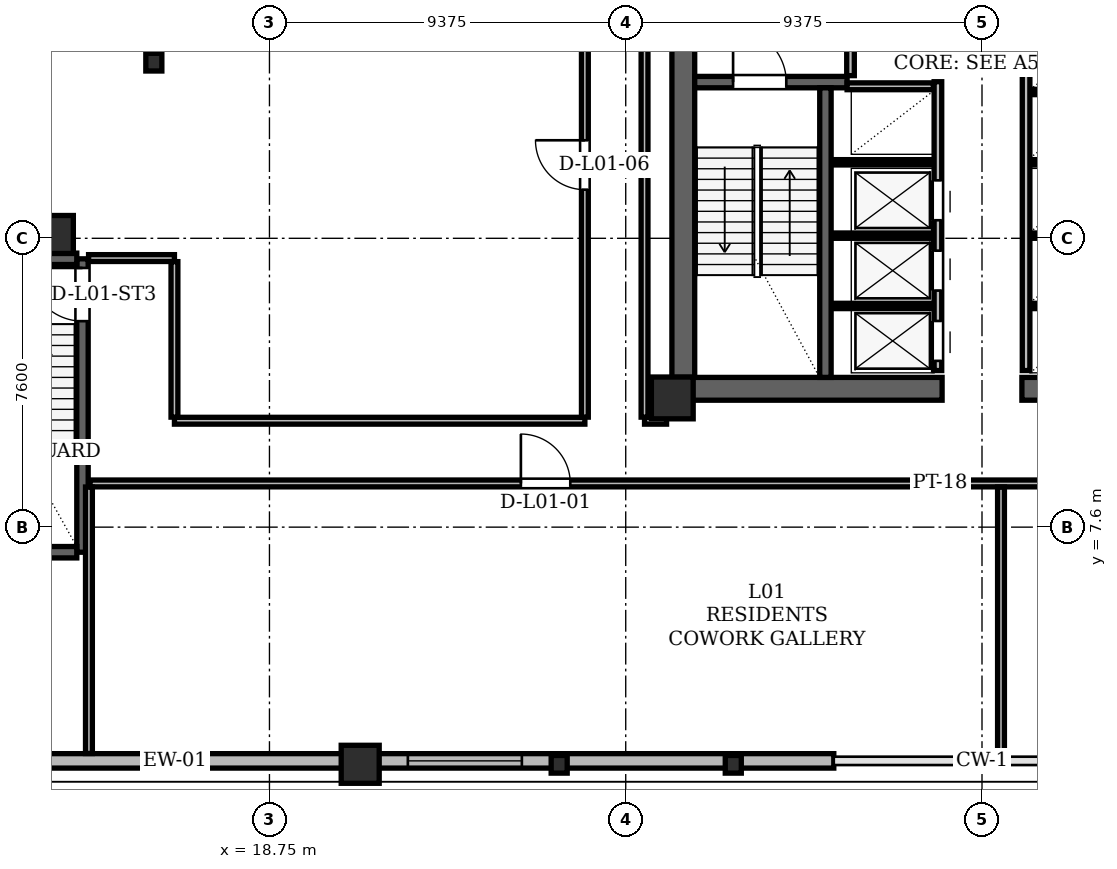
"""IFC4 building model, lengths in metres.
Left out: names, types, materials, properties, quantities, classifications, styles, units other than length and angle.
Written with IfcOpenShell. Run it as: python <this file> out.ifc"""

import sys

from ifc_helpers import new_model, si_unit, direction, frame, frame_2d, origin, origin_2d, place, context, subcontext, project, spatial, rectangle, hollow_rectangle, i_section, extrude, element, fill, save


model = new_model("IFC4")
c1 = context("Model", 3, precision=1e-05, world=origin(), true_north=direction((0.0, 1.0)))
c2 = subcontext(c1, "Body", "Model", "MODEL_VIEW")
j1 = project(units=[si_unit("LENGTHUNIT", "METRE"), si_unit("PLANEANGLEUNIT", "RADIAN")], contexts=[c1])
p1 = place(None, origin())
s1 = spatial("IfcSite", under=j1, at=p1, CompositionType="ELEMENT")
p2 = place(p1, origin())
s2 = spatial("IfcBuilding", under=s1, at=p2, CompositionType="ELEMENT")
p3 = place(p2, frame((0.0, 0.0, 5.4)))
s3 = spatial("IfcBuildingStorey", under=s2, at=p3, CompositionType="ELEMENT", Elevation=5.4)
p4 = place(p3, frame((29.35, 11.0, 0.0), z_axis=(0.0, 0.0, 1.0), x_axis=(1.0, 0.0, 0.0)))
e1 = element("IfcColumn", 1, at=p4, inside=s3, PredefinedType="COLUMN", context=c2, shape_type="SweptSolid", body=[
    extrude(hollow_rectangle(XDim=1.1, YDim=1.1, WallThickness=0.09, at=origin_2d()), origin(), (0.0, 0.0, 1.0), 4.5),
])
for number, where, z_axis, x_axis in (
    (2, (13.09, 15.3, 0.005), (0.0, 0.0, 1.0), (1.0, 0.0, 0.0)),
    (3, (21.138, 1.36, 0.005), (0.0, 0.0, 1.0), (1.0, 0.0, 0.0)),
):
    element("IfcColumn", number, at=place(p3, frame(where, z_axis=z_axis, x_axis=x_axis)), inside=s3, PredefinedType="COLUMN", context=c2, shape_type="SweptSolid", body=[
        extrude(hollow_rectangle(XDim=1.0, YDim=1.0, WallThickness=0.085, at=origin_2d()), origin(), (0.0, 0.0, 1.0), 4.491),
    ])
for number, where, z_axis, x_axis in (
    (4, (26.374, 1.36, 0.005), (0.0, 0.0, 1.0), (1.0, 0.0, 0.0)),
    (5, (30.955, 1.36, 0.005), (0.0, 0.0, 1.0), (1.0, 0.0, 0.0)),
    (6, (15.708, 19.834, 0.005), (0.0, 0.0, 1.0), (1.0, 0.0, 0.0)),
):
    element("IfcColumn", number, at=place(p3, frame(where, z_axis=z_axis, x_axis=x_axis)), inside=s3, PredefinedType="COLUMN", context=c2, shape_type="SweptSolid", body=[
        extrude(i_section(OverallWidth=0.422, OverallDepth=0.465, WebThickness=0.045, FlangeThickness=0.072, at=origin_2d()), origin(), (0.0, 0.0, 1.0), 4.491),
    ])
p5 = place(p3, frame((29.64, 11.0, 0.0), z_axis=(0.0, 0.0, 1.0), x_axis=(0.0, 1.0, 0.0)))
e7 = element("IfcWall", 7, at=p5, inside=s3, PredefinedType="SHEAR", context=c2, shape_type="SweptSolid", body=[
    extrude(rectangle(XDim=13.3, YDim=0.6, at=frame_2d((6.65, 0.0))), origin(), (0.0, 0.0, 1.0), 4.22),
])
for number, where, z_axis, x_axis in (
    (8, (29.35, 11.24, 0.0), (0.0, 0.0, 1.0), (1.0, 0.0, 0.0)),
    (9, (38.55, 11.24, 0.0), (0.0, 0.0, 1.0), (1.0, 0.0, 0.0)),
):
    element("IfcWall", number, at=place(p3, frame(where, z_axis=z_axis, x_axis=x_axis)), inside=s3, PredefinedType="SHEAR", context=c2, shape_type="SweptSolid", body=[
        extrude(rectangle(XDim=7.1, YDim=0.6, at=frame_2d((3.55, 0.0))), origin(), (0.0, 0.0, 1.0), 4.22),
    ])
p6 = place(p3, frame((29.94, 19.31, 0.0), z_axis=(0.0, 0.0, 1.0), x_axis=(1.0, 0.0, 0.0)))
e10 = element("IfcWall", 10, at=p6, inside=s3, PredefinedType="SHEAR", context=c2, shape_type="SweptSolid", body=[
    extrude(rectangle(XDim=4.01, YDim=0.3, at=frame_2d((2.005, 0.0))), origin(), (0.0, 0.0, 1.0), 4.22),
])
p7 = place(p6, frame((1.01, 0.0, 0.0)))
e11 = element("IfcOpeningElement", 11, at=p7, cuts=e10, PredefinedType="OPENING", context=c2, shape_type="SweptSolid", body=[
    extrude(rectangle(XDim=1.4, YDim=2.2, at=frame_2d((0.7, 1.1))), frame((0.0, 0.15, 0.0), z_axis=(0.0, -1.0, 0.0), x_axis=(1.0, 0.0, 0.0)), (0.0, 0.0, 1.0), 0.3),
])
p8 = place(p3, frame((33.38, 11.54, 0.0), z_axis=(0.0, 0.0, 1.0), x_axis=(0.0, 1.0, 0.0)))
e12 = element("IfcWall", 12, at=p8, inside=s3, PredefinedType="SHEAR", context=c2, shape_type="SweptSolid", body=[
    extrude(rectangle(XDim=7.62, YDim=0.3, at=frame_2d((3.81, 0.0))), origin(), (0.0, 0.0, 1.0), 4.22),
])
p9 = place(p3, frame((13.83, 6.94, 0.0), z_axis=(0.0, 0.0, 1.0), x_axis=(0.0, 1.0, 0.0)))
e13 = element("IfcWall", 13, at=p9, inside=s3, PredefinedType="SHEAR", context=c2, shape_type="SweptSolid", body=[
    extrude(rectangle(XDim=7.72, YDim=0.3, at=frame_2d((3.86, 0.0))), origin(), (0.0, 0.0, 1.0), 4.22),
])
p10 = place(p9, frame((6.08, 0.0, 0.0)))
e14 = element("IfcOpeningElement", 14, at=p10, cuts=e13, PredefinedType="OPENING", context=c2, shape_type="SweptSolid", body=[
    extrude(rectangle(XDim=1.4, YDim=2.2, at=frame_2d((0.7, 1.1))), frame((0.0, 0.15, 0.0), z_axis=(0.0, -1.0, 0.0), x_axis=(1.0, 0.0, 0.0)), (0.0, 0.0, 1.0), 0.3),
])
for number, where, z_axis, x_axis in (
    (15, (10.39, 6.94, 0.0), (0.0, 0.0, 1.0), (1.0, 0.0, 0.0)),
    (16, (10.39, 14.66, 0.0), (0.0, 0.0, 1.0), (1.0, 0.0, 0.0)),
):
    element("IfcWall", number, at=place(p3, frame(where, z_axis=z_axis, x_axis=x_axis)), inside=s3, PredefinedType="SHEAR", context=c2, shape_type="SweptSolid", body=[
        extrude(rectangle(XDim=3.29, YDim=0.3, at=frame_2d((1.645, 0.0))), origin(), (0.0, 0.0, 1.0), 4.22),
    ])
p11 = place(p3, frame((-1.072, 1.45, 0.0), z_axis=(0.0, 0.0, 1.0), x_axis=(1.0, 0.0, 0.0)))
e17 = element("IfcWall", 17, at=p11, inside=s3, PredefinedType="SOLIDWALL", context=c2, shape_type="SweptSolid", body=[
    extrude(rectangle(XDim=34.672, YDim=0.38, at=frame_2d((17.336, 0.0))), origin(), (0.0, 0.0, 1.0), 3.283),
])
p12 = place(p11, frame((8.208, 0.0, 0.85)))
e18 = element("IfcOpeningElement", 18, at=p12, cuts=e17, PredefinedType="OPENING", context=c2, shape_type="SweptSolid", body=[
    extrude(rectangle(XDim=3.0, YDim=2.25, at=frame_2d((1.5, 1.125))), frame((0.0, 0.19, 0.0), z_axis=(0.0, -1.0, 0.0), x_axis=(1.0, 0.0, 0.0)), (0.0, 0.0, 1.0), 0.38),
])
p13 = place(p11, frame((23.464, 0.0, 0.85)))
e19 = element("IfcOpeningElement", 19, at=p13, cuts=e17, PredefinedType="OPENING", context=c2, shape_type="SweptSolid", body=[
    extrude(rectangle(XDim=3.0, YDim=2.25, at=frame_2d((1.5, 1.125))), frame((0.0, 0.19, 0.0), z_axis=(0.0, -1.0, 0.0), x_axis=(1.0, 0.0, 0.0)), (0.0, 0.0, 1.0), 0.38),
])
p14 = place(p3, frame((34.04, 19.48, 0.0), z_axis=(0.0, 0.0, 1.0), x_axis=(0.0, 1.0, 0.0)))
e20 = element("IfcWall", 20, at=p14, inside=s3, PredefinedType="PARTITIONING", context=c2, shape_type="SweptSolid", body=[
    extrude(rectangle(XDim=4.5, YDim=0.2, at=frame_2d((2.25, 0.0))), origin(), (0.0, 0.0, 1.0), 3.26),
])
p15 = place(p14, frame((2.12, 0.0, 0.0)))
e21 = element("IfcOpeningElement", 21, at=p15, cuts=e20, PredefinedType="OPENING", context=c2, shape_type="SweptSolid", body=[
    extrude(rectangle(XDim=1.1, YDim=2.2, at=frame_2d((0.55, 1.1))), frame((0.0, 0.1, 0.0), z_axis=(0.0, -1.0, 0.0), x_axis=(1.0, 0.0, 0.0)), (0.0, 0.0, 1.0), 0.2),
])
p16 = place(p3, frame((36.34, 11.72, 0.0), z_axis=(0.0, 0.0, 1.0), x_axis=(0.0, 1.0, 0.0)))
e22 = element("IfcWall", 22, at=p16, inside=s3, PredefinedType="PARTITIONING", context=c2, shape_type="SweptSolid", body=[
    extrude(rectangle(XDim=7.6, YDim=0.2, at=frame_2d((3.8, 0.0))), origin(), (0.0, 0.0, 1.0), 4.22),
])
p17 = place(p16, frame((0.255, 0.0, 0.0)))
e23 = element("IfcOpeningElement", 23, at=p17, cuts=e22, PredefinedType="OPENING", context=c2, shape_type="SweptSolid", body=[
    extrude(rectangle(XDim=1.05, YDim=2.15, at=frame_2d((0.525, 1.075))), frame((0.0, 0.1, 0.0), z_axis=(0.0, -1.0, 0.0), x_axis=(1.0, 0.0, 0.0)), (0.0, 0.0, 1.0), 0.2),
])
p18 = place(p16, frame((2.105, 0.0, 0.0)))
e24 = element("IfcOpeningElement", 24, at=p18, cuts=e22, PredefinedType="OPENING", context=c2, shape_type="SweptSolid", body=[
    extrude(rectangle(XDim=1.05, YDim=2.15, at=frame_2d((0.525, 1.075))), frame((0.0, 0.1, 0.0), z_axis=(0.0, -1.0, 0.0), x_axis=(1.0, 0.0, 0.0)), (0.0, 0.0, 1.0), 0.2),
])
p19 = place(p16, frame((3.955, 0.0, 0.0)))
e25 = element("IfcOpeningElement", 25, at=p19, cuts=e22, PredefinedType="OPENING", context=c2, shape_type="SweptSolid", body=[
    extrude(rectangle(XDim=1.05, YDim=2.15, at=frame_2d((0.525, 1.075))), frame((0.0, 0.1, 0.0), z_axis=(0.0, -1.0, 0.0), x_axis=(1.0, 0.0, 0.0)), (0.0, 0.0, 1.0), 0.2),
])
p20 = place(p3, frame((33.95, 19.2, 0.0), z_axis=(0.0, 0.0, 1.0), x_axis=(1.0, 0.0, 0.0)))
e26 = element("IfcWall", 26, at=p20, inside=s3, PredefinedType="PARTITIONING", context=c2, shape_type="SweptSolid", body=[
    extrude(rectangle(XDim=2.27, YDim=0.18, at=frame_2d((1.135, 0.0))), origin(), (0.0, 0.0, 1.0), 4.22),
])
for number, where, z_axis, x_axis in (
    (27, (33.56, 13.42, 0.0), (0.0, 0.0, 1.0), (1.0, 0.0, 0.0)),
    (28, (33.56, 15.27, 0.0), (0.0, 0.0, 1.0), (1.0, 0.0, 0.0)),
    (29, (33.56, 17.2, 0.0), (0.0, 0.0, 1.0), (1.0, 0.0, 0.0)),
):
    element("IfcWall", number, at=place(p3, frame(where, z_axis=z_axis, x_axis=x_axis)), inside=s3, PredefinedType="PARTITIONING", context=c2, shape_type="SweptSolid", body=[
        extrude(rectangle(XDim=2.66, YDim=0.14, at=frame_2d((1.33, 0.0))), origin(), (0.0, 0.0, 1.0), 4.22),
    ])
p21 = place(p3, frame((38.66, 11.72, 0.0), z_axis=(0.0, 0.0, 1.0), x_axis=(0.0, 1.0, 0.0)))
e30 = element("IfcWall", 30, at=p21, inside=s3, PredefinedType="PARTITIONING", context=c2, shape_type="SweptSolid", body=[
    extrude(rectangle(XDim=9.1, YDim=0.2, at=frame_2d((4.55, 0.0))), origin(), (0.0, 0.0, 1.0), 4.22),
])
for number, where, z_axis, x_axis in (
    (31, (38.78, 13.42, 0.0), (0.0, 0.0, 1.0), (1.0, 0.0, 0.0)),
    (32, (38.78, 15.27, 0.0), (0.0, 0.0, 1.0), (1.0, 0.0, 0.0)),
    (33, (38.78, 17.2, 0.0), (0.0, 0.0, 1.0), (1.0, 0.0, 0.0)),
    (34, (38.78, 19.05, 0.0), (0.0, 0.0, 1.0), (1.0, 0.0, 0.0)),
):
    element("IfcWall", number, at=place(p3, frame(where, z_axis=z_axis, x_axis=x_axis)), inside=s3, PredefinedType="PARTITIONING", context=c2, shape_type="SweptSolid", body=[
        extrude(rectangle(XDim=2.66, YDim=0.14, at=frame_2d((1.33, 0.0))), origin(), (0.0, 0.0, 1.0), 4.22),
    ])
p22 = place(p3, frame((14.03, 8.75, 0.0), z_axis=(0.0, 0.0, 1.0), x_axis=(1.0, 0.0, 0.0)))
e35 = element("IfcWall", 35, at=p22, inside=s3, PredefinedType="PARTITIONING", context=c2, shape_type="SweptSolid", body=[
    extrude(rectangle(XDim=41.57, YDim=0.18, at=frame_2d((20.785, 0.0))), origin(), (0.0, 0.0, 1.0), 3.283),
])
p23 = place(p22, frame((11.336, 0.0, 0.0)))
e36 = element("IfcOpeningElement", 36, at=p23, cuts=e35, PredefinedType="OPENING", context=c2, shape_type="SweptSolid", body=[
    extrude(rectangle(XDim=1.3, YDim=2.2, at=frame_2d((0.65, 1.1))), frame((0.0, 0.09, 0.0), z_axis=(0.0, -1.0, 0.0), x_axis=(1.0, 0.0, 0.0)), (0.0, 0.0, 1.0), 0.18),
])
p24 = place(p22, frame((32.094, 0.0, 0.0)))
e37 = element("IfcOpeningElement", 37, at=p24, cuts=e35, PredefinedType="OPENING", context=c2, shape_type="SweptSolid", body=[
    extrude(rectangle(XDim=1.3, YDim=2.2, at=frame_2d((0.65, 1.1))), frame((0.0, 0.09, 0.0), z_axis=(0.0, -1.0, 0.0), x_axis=(1.0, 0.0, 0.0)), (0.0, 0.0, 1.0), 0.18),
])
p25 = place(p3, frame((16.25, 10.4, 0.0), z_axis=(0.0, 0.0, 1.0), x_axis=(1.0, 0.0, 0.0)))
e38 = element("IfcWall", 38, at=p25, inside=s3, PredefinedType="PARTITIONING", context=c2, shape_type="SweptSolid", body=[
    extrude(rectangle(XDim=10.8, YDim=0.18, at=frame_2d((5.4, 0.0))), origin(), (0.0, 0.0, 1.0), 4.22),
])
p26 = place(p3, frame((28.62, 10.4, 0.0), z_axis=(0.0, 0.0, 1.0), x_axis=(1.0, 0.0, 0.0)))
e39 = element("IfcWall", 39, at=p26, inside=s3, PredefinedType="PARTITIONING", context=c2, shape_type="SweptSolid", body=[
    extrude(rectangle(XDim=0.58, YDim=0.18, at=frame_2d((0.29, 0.0))), origin(), (0.0, 0.0, 1.0), 3.283),
])
p27 = place(p3, frame((13.99, 14.68, 0.0), z_axis=(0.0, 0.0, 1.0), x_axis=(1.0, 0.0, 0.0)))
e40 = element("IfcWall", 40, at=p27, inside=s3, PredefinedType="PARTITIONING", context=c2, shape_type="SweptSolid", body=[
    extrude(rectangle(XDim=2.26, YDim=0.18, at=frame_2d((1.13, 0.0))), origin(), (0.0, 0.0, 1.0), 3.283),
])
p28 = place(p3, frame((14.0, 1.644, 0.0), z_axis=(0.0, 0.0, 1.0), x_axis=(0.0, 1.0, 0.0)))
e41 = element("IfcWall", 41, at=p28, inside=s3, PredefinedType="PARTITIONING", context=c2, shape_type="SweptSolid", body=[
    extrude(rectangle(XDim=7.012, YDim=0.18, at=frame_2d((3.506, 0.0))), origin(), (0.0, 0.0, 1.0), 4.22),
])
p29 = place(p3, frame((16.25, 10.494, 0.0), z_axis=(0.0, 0.0, 1.0), x_axis=(0.0, 1.0, 0.0)))
e42 = element("IfcWall", 42, at=p29, inside=s3, PredefinedType="PARTITIONING", context=c2, shape_type="SweptSolid", body=[
    extrude(rectangle(XDim=4.092, YDim=0.18, at=frame_2d((2.046, 0.0))), origin(), (0.0, 0.0, 1.0), 3.283),
])
p30 = place(p3, frame((27.05, 10.494, 0.0), z_axis=(0.0, 0.0, 1.0), x_axis=(0.0, 1.0, 0.0)))
e43 = element("IfcWall", 43, at=p30, inside=s3, PredefinedType="PARTITIONING", context=c2, shape_type="SweptSolid", body=[
    extrude(rectangle(XDim=28.386, YDim=0.18, at=frame_2d((14.193, 0.0))), origin(), (0.0, 0.0, 1.0), 3.283),
])
p31 = place(p30, frame((5.985, 0.0, 0.0)))
e44 = element("IfcOpeningElement", 44, at=p31, cuts=e43, PredefinedType="OPENING", context=c2, shape_type="SweptSolid", body=[
    extrude(rectangle(XDim=1.3, YDim=2.2, at=frame_2d((0.65, 1.1))), frame((0.0, 0.09, 0.0), z_axis=(0.0, -1.0, 0.0), x_axis=(1.0, 0.0, 0.0)), (0.0, 0.0, 1.0), 0.18),
])
p32 = place(p3, frame((28.62, 10.494, 0.0), z_axis=(0.0, 0.0, 1.0), x_axis=(0.0, 1.0, 0.0)))
e45 = element("IfcWall", 45, at=p32, inside=s3, PredefinedType="PARTITIONING", context=c2, shape_type="SweptSolid", body=[
    extrude(rectangle(XDim=14.162, YDim=0.18, at=frame_2d((7.081, 0.0))), origin(), (0.0, 0.0, 1.0), 3.283),
])
p33 = place(p3, frame((38.0, 1.564, 0.0), z_axis=(0.0, 0.0, 1.0), x_axis=(0.0, 1.0, 0.0)))
e46 = element("IfcWall", 46, at=p33, inside=s3, PredefinedType="PARTITIONING", context=c2, shape_type="SweptSolid", body=[
    extrude(rectangle(XDim=7.092, YDim=0.18, at=frame_2d((3.546, 0.0))), origin(), (0.0, 0.0, 1.0), 4.22),
])
p34 = place(p13, origin())
e47 = element("IfcWindow", 47, at=p34, inside=s3, PartitioningType="SINGLE_PANEL", PredefinedType="WINDOW", context=c2, shape_type="SweptSolid", body=[
    extrude(rectangle(XDim=3.0, YDim=2.25, at=frame_2d((1.5, 1.125))), frame((0.0, 0.03, 0.0), z_axis=(0.0, -1.0, 0.0), x_axis=(1.0, 0.0, 0.0)), (0.0, 0.0, 1.0), 0.06),
])
fill(e19, e47)
p35 = place(p17, origin())
e48 = element("IfcDoor", 48, at=p35, inside=s3, OperationType="SLIDING_TO_LEFT", PredefinedType="DOOR", context=c2, shape_type="SweptSolid", body=[
    extrude(rectangle(XDim=1.05, YDim=2.15, at=frame_2d((0.525, 1.075))), frame((0.0, 0.025, 0.0), z_axis=(0.0, -1.0, 0.0), x_axis=(1.0, 0.0, 0.0)), (0.0, 0.0, 1.0), 0.05),
])
fill(e23, e48)
p36 = place(p18, origin())
e49 = element("IfcDoor", 49, at=p36, inside=s3, OperationType="SLIDING_TO_RIGHT", PredefinedType="DOOR", context=c2, shape_type="SweptSolid", body=[
    extrude(rectangle(XDim=1.05, YDim=2.15, at=frame_2d((0.525, 1.075))), frame((0.0, 0.025, 0.0), z_axis=(0.0, -1.0, 0.0), x_axis=(1.0, 0.0, 0.0)), (0.0, 0.0, 1.0), 0.05),
])
fill(e24, e49)
p37 = place(p19, origin())
e50 = element("IfcDoor", 50, at=p37, inside=s3, OperationType="SLIDING_TO_LEFT", PredefinedType="DOOR", context=c2, shape_type="SweptSolid", body=[
    extrude(rectangle(XDim=1.05, YDim=2.15, at=frame_2d((0.525, 1.075))), frame((0.0, 0.025, 0.0), z_axis=(0.0, -1.0, 0.0), x_axis=(1.0, 0.0, 0.0)), (0.0, 0.0, 1.0), 0.05),
])
fill(e25, e50)
p38 = place(p7, origin())
e51 = element("IfcDoor", 51, at=p38, inside=s3, OperationType="SINGLE_SWING_LEFT", PredefinedType="DOOR", context=c2, shape_type="SweptSolid", body=[
    extrude(rectangle(XDim=1.4, YDim=2.2, at=frame_2d((0.7, 1.1))), frame((0.0, 0.025, 0.0), z_axis=(0.0, -1.0, 0.0), x_axis=(1.0, 0.0, 0.0)), (0.0, 0.0, 1.0), 0.05),
])
fill(e11, e51)
p39 = place(p10, origin())
e52 = element("IfcDoor", 52, at=p39, inside=s3, OperationType="SINGLE_SWING_RIGHT", PredefinedType="DOOR", context=c2, shape_type="SweptSolid", body=[
    extrude(rectangle(XDim=1.4, YDim=2.2, at=frame_2d((0.7, 1.1))), frame((0.0, 0.025, 0.0), z_axis=(0.0, -1.0, 0.0), x_axis=(1.0, 0.0, 0.0)), (0.0, 0.0, 1.0), 0.05),
])
fill(e14, e52)
p40 = place(p23, origin())
e53 = element("IfcDoor", 53, at=p40, inside=s3, OperationType="SINGLE_SWING_LEFT", PredefinedType="DOOR", context=c2, shape_type="SweptSolid", body=[
    extrude(rectangle(XDim=1.3, YDim=2.2, at=frame_2d((0.65, 1.1))), frame((0.0, 0.025, 0.0), z_axis=(0.0, -1.0, 0.0), x_axis=(1.0, 0.0, 0.0)), (0.0, 0.0, 1.0), 0.05),
])
fill(e36, e53)
p41 = place(p31, origin())
e54 = element("IfcDoor", 54, at=p41, inside=s3, OperationType="SINGLE_SWING_RIGHT", PredefinedType="DOOR", context=c2, shape_type="SweptSolid", body=[
    extrude(rectangle(XDim=1.3, YDim=2.2, at=frame_2d((0.65, 1.1))), frame((0.0, 0.025, 0.0), z_axis=(0.0, -1.0, 0.0), x_axis=(1.0, 0.0, 0.0)), (0.0, 0.0, 1.0), 0.05),
])
fill(e44, e54)
save(model, sys.argv[1])
